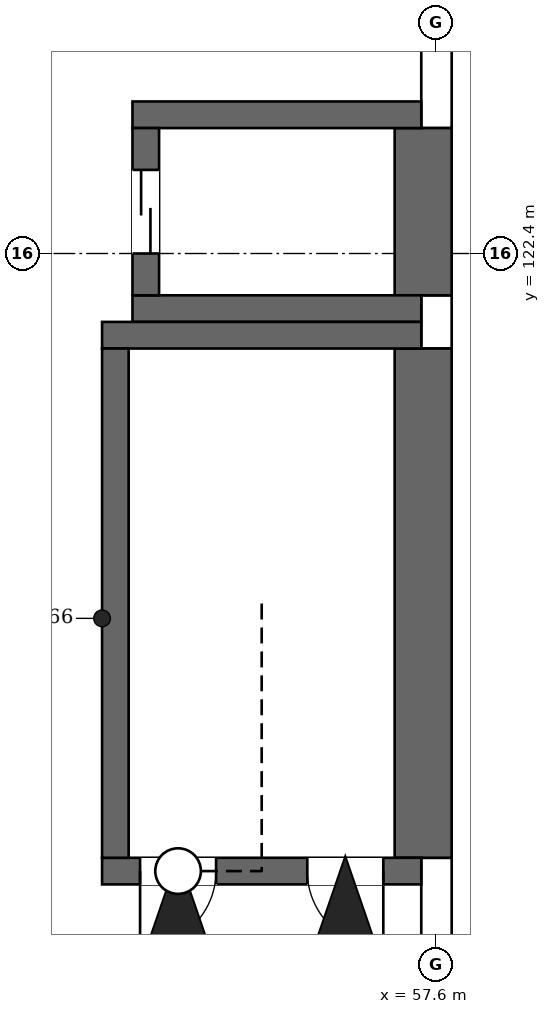
"""IFC4 building model, lengths in metres.
Left out: names, types, materials, properties, quantities, classifications, styles, units other than length and angle.
Written with IfcOpenShell. Run it as: python <this file> out.ifc"""

import sys

from ifc_helpers import new_model, si_unit, direction, frame, frame_2d, origin, place, context, subcontext, project, spatial, rectangle, extrude, element, fill, save


model = new_model("IFC4")
c1 = context("Model", 3, precision=1e-05, world=origin(), true_north=direction((0.0, 1.0)))
c2 = subcontext(c1, "Body", "Model", "MODEL_VIEW")
j1 = project(units=[si_unit("LENGTHUNIT", "METRE"), si_unit("PLANEANGLEUNIT", "RADIAN")], contexts=[c1])
p1 = place(None, origin())
s1 = spatial("IfcSite", under=j1, at=p1, CompositionType="ELEMENT")
p2 = place(p1, origin())
s2 = spatial("IfcBuilding", under=s1, at=p2, CompositionType="ELEMENT")
p3 = place(p2, frame((0.0, 0.0, 31.9)))
s3 = spatial("IfcBuildingStorey", under=s2, at=p3, CompositionType="ELEMENT", Elevation=31.9)
p4 = place(p3, frame((53.2, 114.275, 0.0), z_axis=(0.0, 0.0, 1.0), x_axis=(1.0, 0.0, 0.0)))
e1 = element("IfcWall", 1, at=p4, inside=s3, PredefinedType="SHEAR", context=c2, shape_type="SweptSolid", body=[
    extrude(rectangle(XDim=4.2, YDim=0.35, at=frame_2d((2.1, 0.0))), origin(), (0.0, 0.0, 1.0), 3.2),
])
p5 = place(p4, frame((0.5, 0.0, 0.0)))
e2 = element("IfcOpeningElement", 2, at=p5, cuts=e1, PredefinedType="OPENING", context=c2, shape_type="SweptSolid", body=[
    extrude(rectangle(XDim=1.0, YDim=2.1, at=frame_2d((0.5, 1.05))), frame((0.0, 0.185, 0.0), z_axis=(0.0, -1.0, 0.0), x_axis=(1.0, 0.0, 0.0)), (0.0, 0.0, 1.0), 0.37),
])
p6 = place(p4, frame((2.7, 0.0, 0.0)))
e3 = element("IfcOpeningElement", 3, at=p6, cuts=e1, PredefinedType="OPENING", context=c2, shape_type="SweptSolid", body=[
    extrude(rectangle(XDim=1.0, YDim=2.1, at=frame_2d((0.5, 1.05))), frame((0.0, 0.185, 0.0), z_axis=(0.0, -1.0, 0.0), x_axis=(1.0, 0.0, 0.0)), (0.0, 0.0, 1.0), 0.37),
])
p7 = place(p3, frame((53.2, 121.325, 0.0), z_axis=(0.0, 0.0, 1.0), x_axis=(1.0, 0.0, 0.0)))
e4 = element("IfcWall", 4, at=p7, inside=s3, PredefinedType="SHEAR", context=c2, shape_type="SweptSolid", body=[
    extrude(rectangle(XDim=4.2, YDim=0.35, at=frame_2d((2.1, 0.0))), origin(), (0.0, 0.0, 1.0), 3.2),
])
p8 = place(p3, frame((53.375, 114.45, 0.0), z_axis=(0.0, 0.0, 1.0), x_axis=(0.0, 1.0, 0.0)))
e5 = element("IfcWall", 5, at=p8, inside=s3, PredefinedType="SHEAR", context=c2, shape_type="SweptSolid", body=[
    extrude(rectangle(XDim=6.7, YDim=0.35, at=frame_2d((3.35, 0.0))), origin(), (0.0, 0.0, 1.0), 3.2),
])
p9 = place(p3, frame((57.425, 114.45, 0.0), z_axis=(0.0, 0.0, 1.0), x_axis=(0.0, 1.0, 0.0)))
e6 = element("IfcWall", 6, at=p9, inside=s3, PredefinedType="SHEAR", context=c2, shape_type="SweptSolid", body=[
    extrude(rectangle(XDim=6.7, YDim=0.75, at=frame_2d((3.35, 0.0))), origin(), (0.0, 0.0, 1.0), 3.2),
])
for number, where, z_axis, x_axis in (
    (7, (53.6, 121.675, 0.0), (0.0, 0.0, 1.0), (1.0, 0.0, 0.0)),
    (8, (53.6, 124.225, 0.0), (0.0, 0.0, 1.0), (1.0, 0.0, 0.0)),
):
    element("IfcWall", number, at=place(p3, frame(where, z_axis=z_axis, x_axis=x_axis)), inside=s3, PredefinedType="SHEAR", context=c2, shape_type="SweptSolid", body=[
        extrude(rectangle(XDim=3.8, YDim=0.35, at=frame_2d((1.9, 0.0))), origin(), (0.0, 0.0, 1.0), 4.2),
    ])
p10 = place(p3, frame((53.775, 121.85, 0.0), z_axis=(0.0, 0.0, 1.0), x_axis=(0.0, 1.0, 0.0)))
e9 = element("IfcWall", 9, at=p10, inside=s3, PredefinedType="SHEAR", context=c2, shape_type="SweptSolid", body=[
    extrude(rectangle(XDim=2.2, YDim=0.35, at=frame_2d((1.1, 0.0))), origin(), (0.0, 0.0, 1.0), 4.2),
])
p11 = place(p10, frame((0.55, 0.0, 0.0)))
e10 = element("IfcOpeningElement", 10, at=p11, cuts=e9, PredefinedType="OPENING", context=c2, shape_type="SweptSolid", body=[
    extrude(rectangle(XDim=1.1, YDim=2.1, at=frame_2d((0.55, 1.05))), frame((0.0, 0.185, 0.0), z_axis=(0.0, -1.0, 0.0), x_axis=(1.0, 0.0, 0.0)), (0.0, 0.0, 1.0), 0.37),
])
p12 = place(p3, frame((57.425, 121.85, 0.0), z_axis=(0.0, 0.0, 1.0), x_axis=(0.0, 1.0, 0.0)))
e11 = element("IfcWall", 11, at=p12, inside=s3, PredefinedType="SHEAR", context=c2, shape_type="SweptSolid", body=[
    extrude(rectangle(XDim=2.2, YDim=0.75, at=frame_2d((1.1, 0.0))), origin(), (0.0, 0.0, 1.0), 4.2),
])
p13 = place(p3, frame((57.6, 94.12, 0.0), z_axis=(0.0, 0.0, 1.0), x_axis=(0.0, 1.0, 0.0)))
e12 = element("IfcWall", 12, at=p13, inside=s3, PredefinedType="PARAPET", context=c2, shape_type="SweptSolid", body=[
    extrude(rectangle(XDim=20.33, YDim=0.4, at=frame_2d((10.165, 0.0))), origin(), (0.0, 0.0, 1.0), 1.1),
])
p14 = place(p3, frame((57.6, 121.15, 0.0), z_axis=(0.0, 0.0, 1.0), x_axis=(0.0, 1.0, 0.0)))
e13 = element("IfcWall", 13, at=p14, inside=s3, PredefinedType="PARAPET", context=c2, shape_type="SweptSolid", body=[
    extrude(rectangle(XDim=0.7, YDim=0.4, at=frame_2d((0.35, 0.0))), origin(), (0.0, 0.0, 1.0), 1.1),
])
p15 = place(p3, frame((57.6, 124.05, 0.0), z_axis=(0.0, 0.0, 1.0), x_axis=(0.0, 1.0, 0.0)))
e14 = element("IfcWall", 14, at=p15, inside=s3, PredefinedType="PARAPET", context=c2, shape_type="SweptSolid", body=[
    extrude(rectangle(XDim=2.8, YDim=0.4, at=frame_2d((1.4, 0.0))), origin(), (0.0, 0.0, 1.0), 1.1),
])
p16 = place(p5, frame((1.0, 0.0, 0.0), z_axis=(0.0, 0.0, 1.0), x_axis=(-1.0, 0.0, 0.0)))
e15 = element("IfcDoor", 15, at=p16, inside=s3, OperationType="SINGLE_SWING_LEFT", PredefinedType="DOOR", context=c2, shape_type="SweptSolid", body=[
    extrude(rectangle(XDim=1.0, YDim=2.1, at=frame_2d((0.5, 1.05))), frame((0.0, 0.025, 0.0), z_axis=(0.0, -1.0, 0.0), x_axis=(1.0, 0.0, 0.0)), (0.0, 0.0, 1.0), 0.05),
])
fill(e2, e15)
p17 = place(p6, frame((1.0, 0.0, 0.0), z_axis=(0.0, 0.0, 1.0), x_axis=(-1.0, 0.0, 0.0)))
e16 = element("IfcDoor", 16, at=p17, inside=s3, OperationType="SINGLE_SWING_RIGHT", PredefinedType="DOOR", context=c2, shape_type="SweptSolid", body=[
    extrude(rectangle(XDim=1.0, YDim=2.1, at=frame_2d((0.5, 1.05))), frame((0.0, 0.025, 0.0), z_axis=(0.0, -1.0, 0.0), x_axis=(1.0, 0.0, 0.0)), (0.0, 0.0, 1.0), 0.05),
])
fill(e3, e16)
p18 = place(p11, origin())
e17 = element("IfcDoor", 17, at=p18, inside=s3, OperationType="DOUBLE_DOOR_SLIDING", PredefinedType="DOOR", context=c2, shape_type="SweptSolid", body=[
    extrude(rectangle(XDim=1.1, YDim=2.1, at=frame_2d((0.55, 1.05))), frame((0.0, 0.025, 0.0), z_axis=(0.0, -1.0, 0.0), x_axis=(1.0, 0.0, 0.0)), (0.0, 0.0, 1.0), 0.05),
])
fill(e10, e17)
save(model, sys.argv[1])
